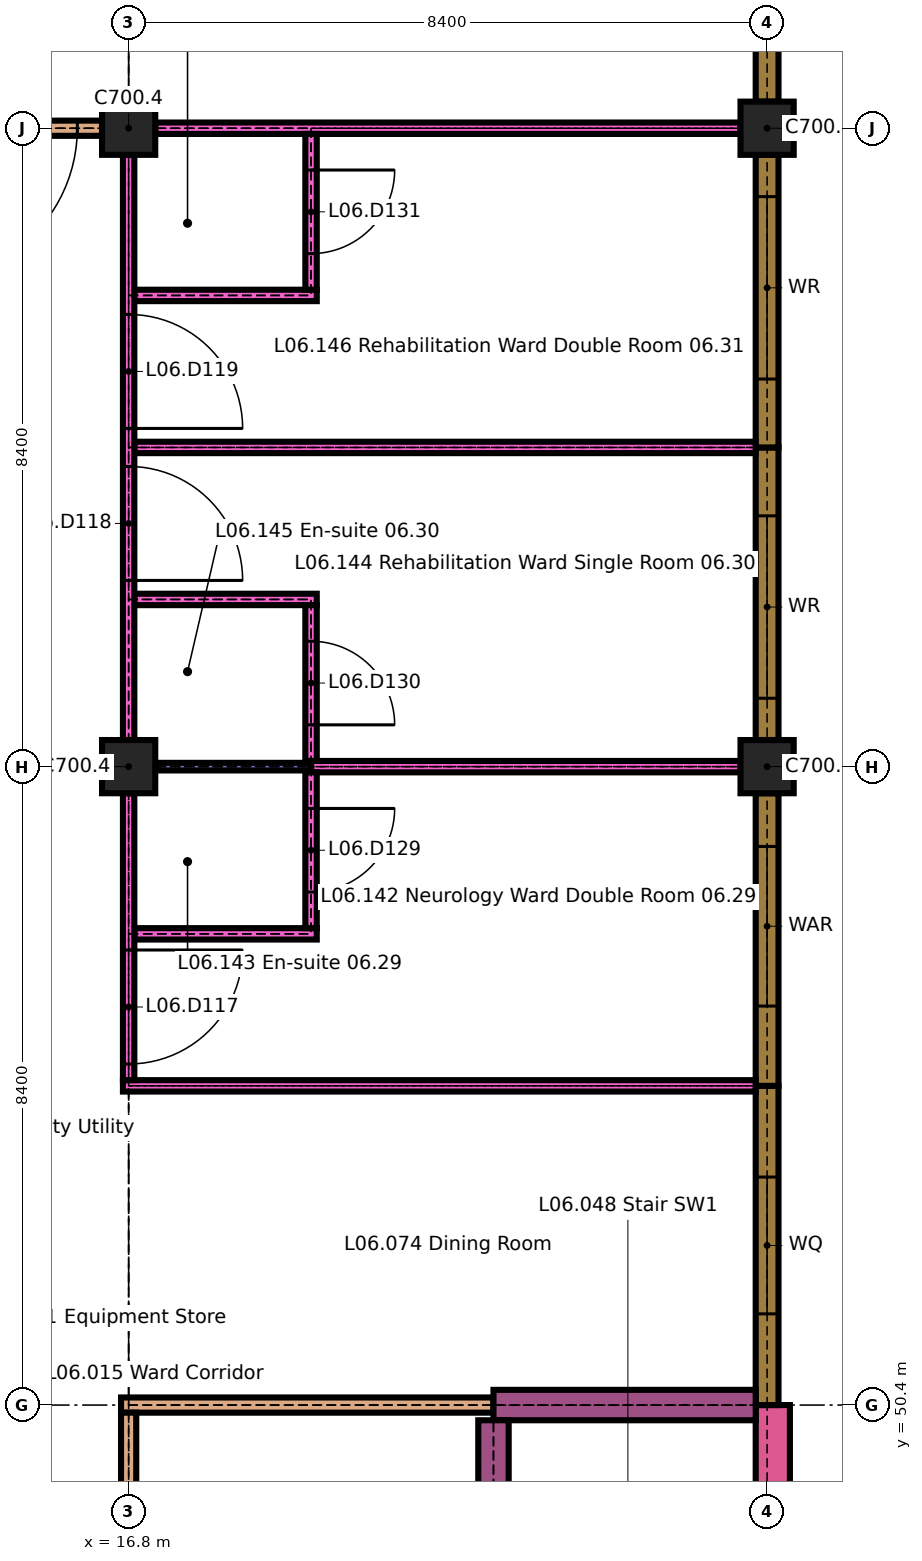
"""IFC4 building model, lengths in metres.
Left out: names, types, materials, properties, quantities, classifications, styles, units other than length and angle.
Written with IfcOpenShell. Run it as: python <this file> out.ifc"""

import sys

from ifc_helpers import new_model, si_unit, direction, frame, frame_2d, origin, origin_2d, place, context, subcontext, project, spatial, rectangle, extrude, element, fill, save


model = new_model("IFC4")
c1 = context("Model", 3, precision=1e-05, world=origin(), true_north=direction((0.0, 1.0)))
c2 = subcontext(c1, "Body", "Model", "MODEL_VIEW")
j1 = project(units=[si_unit("LENGTHUNIT", "METRE"), si_unit("PLANEANGLEUNIT", "RADIAN")], contexts=[c1])
p1 = place(None, origin())
s1 = spatial("IfcSite", under=j1, at=p1, CompositionType="ELEMENT")
p2 = place(p1, origin())
s2 = spatial("IfcBuilding", under=s1, at=p2, CompositionType="ELEMENT")
p3 = place(p2, frame((0.0, 0.0, 26.1)))
s3 = spatial("IfcBuildingStorey", under=s2, at=p3, CompositionType="ELEMENT", Elevation=26.1)
p4 = place(p3, frame((16.8, 58.8, 0.0), z_axis=(0.0, 0.0, 1.0), x_axis=(1.0, 0.0, 0.0)))
e1 = element("IfcColumn", 1, at=p4, inside=s3, PredefinedType="COLUMN", context=c2, shape_type="SweptSolid", body=[
    extrude(rectangle(XDim=0.7, YDim=0.7, at=origin_2d()), origin(), (0.0, 0.0, 1.0), 3.3),
])
p5 = place(p3, frame((25.2, 58.8, 0.0), z_axis=(0.0, 0.0, 1.0), x_axis=(1.0, 0.0, 0.0)))
e2 = element("IfcColumn", 2, at=p5, inside=s3, PredefinedType="COLUMN", context=c2, shape_type="SweptSolid", body=[
    extrude(rectangle(XDim=0.7, YDim=0.7, at=origin_2d()), origin(), (0.0, 0.0, 1.0), 3.2),
])
p6 = place(p3, frame((16.8, 67.2, 0.0), z_axis=(0.0, 0.0, 1.0), x_axis=(1.0, 0.0, 0.0)))
e3 = element("IfcColumn", 3, at=p6, inside=s3, PredefinedType="COLUMN", context=c2, shape_type="SweptSolid", body=[
    extrude(rectangle(XDim=0.7, YDim=0.7, at=origin_2d()), origin(), (0.0, 0.0, 1.0), 3.3),
])
p7 = place(p3, frame((25.2, 67.2, 0.0), z_axis=(0.0, 0.0, 1.0), x_axis=(1.0, 0.0, 0.0)))
e4 = element("IfcColumn", 4, at=p7, inside=s3, PredefinedType="COLUMN", context=c2, shape_type="SweptSolid", body=[
    extrude(rectangle(XDim=0.7, YDim=0.7, at=origin_2d()), origin(), (0.0, 0.0, 1.0), 3.2),
])
p8 = place(p3, frame((25.275, 46.55, 0.0), z_axis=(0.0, 0.0, 1.0), x_axis=(0.0, 1.0, 0.0)))
e5 = element("IfcWall", 5, at=p8, inside=s3, PredefinedType="SOLIDWALL", context=c2, shape_type="SweptSolid", body=[
    extrude(rectangle(XDim=3.85, YDim=0.45, at=frame_2d((1.925, 0.0))), origin(), (0.0, 0.0, 1.0), 3.3),
])
p9 = place(p3, frame((25.2, 50.4, 0.0), z_axis=(0.0, 0.0, 1.0), x_axis=(0.0, 1.0, 0.0)))
e6 = element("IfcWall", 6, at=p9, inside=s3, PredefinedType="SOLIDWALL", context=c2, shape_type="SweptSolid", body=[
    extrude(rectangle(XDim=4.2, YDim=0.3, at=frame_2d((2.1, 0.0))), origin(), (0.0, 0.0, 1.0), 2.9),
])
p10 = place(p9, frame((1.2, 0.0, 1.05)))
e7 = element("IfcOpeningElement", 7, at=p10, cuts=e6, PredefinedType="OPENING", context=c2, shape_type="SweptSolid", body=[
    extrude(rectangle(XDim=1.8, YDim=1.2, at=frame_2d((0.9, 0.6))), frame((0.0, 0.16, 0.0), z_axis=(0.0, -1.0, 0.0), x_axis=(1.0, 0.0, 0.0)), (0.0, 0.0, 1.0), 0.32),
])
p11 = place(p3, frame((25.2, 54.6, 0.0), z_axis=(0.0, 0.0, 1.0), x_axis=(0.0, 1.0, 0.0)))
e8 = element("IfcWall", 8, at=p11, inside=s3, PredefinedType="SOLIDWALL", context=c2, shape_type="SweptSolid", body=[
    extrude(rectangle(XDim=3.85, YDim=0.3, at=frame_2d((1.925, 0.0))), origin(), (0.0, 0.0, 1.0), 2.9),
])
p12 = place(p11, frame((1.05, 0.0, 0.9)))
e9 = element("IfcOpeningElement", 9, at=p12, cuts=e8, PredefinedType="OPENING", context=c2, shape_type="SweptSolid", body=[
    extrude(rectangle(XDim=2.1, YDim=1.5, at=frame_2d((1.05, 0.75))), frame((0.0, 0.16, 0.0), z_axis=(0.0, -1.0, 0.0), x_axis=(1.0, 0.0, 0.0)), (0.0, 0.0, 1.0), 0.32),
])
p13 = place(p3, frame((25.2, 59.15, 0.0), z_axis=(0.0, 0.0, 1.0), x_axis=(0.0, 1.0, 0.0)))
e10 = element("IfcWall", 10, at=p13, inside=s3, PredefinedType="SOLIDWALL", context=c2, shape_type="SweptSolid", body=[
    extrude(rectangle(XDim=3.85, YDim=0.3, at=frame_2d((1.925, 0.0))), origin(), (0.0, 0.0, 1.0), 2.9),
])
p14 = place(p13, frame((0.55, 0.0, 0.6)))
e11 = element("IfcOpeningElement", 11, at=p14, cuts=e10, PredefinedType="OPENING", context=c2, shape_type="SweptSolid", body=[
    extrude(rectangle(XDim=2.4, YDim=1.8, at=frame_2d((1.2, 0.9))), frame((0.0, 0.16, 0.0), z_axis=(0.0, -1.0, 0.0), x_axis=(1.0, 0.0, 0.0)), (0.0, 0.0, 1.0), 0.32),
])
p15 = place(p3, frame((25.2, 63.0, 0.0), z_axis=(0.0, 0.0, 1.0), x_axis=(0.0, 1.0, 0.0)))
e12 = element("IfcWall", 12, at=p15, inside=s3, PredefinedType="SOLIDWALL", context=c2, shape_type="SweptSolid", body=[
    extrude(rectangle(XDim=3.85, YDim=0.3, at=frame_2d((1.925, 0.0))), origin(), (0.0, 0.0, 1.0), 2.9),
])
p16 = place(p15, frame((0.9, 0.0, 0.6)))
e13 = element("IfcOpeningElement", 13, at=p16, cuts=e12, PredefinedType="OPENING", context=c2, shape_type="SweptSolid", body=[
    extrude(rectangle(XDim=2.4, YDim=1.8, at=frame_2d((1.2, 0.9))), frame((0.0, 0.16, 0.0), z_axis=(0.0, -1.0, 0.0), x_axis=(1.0, 0.0, 0.0)), (0.0, 0.0, 1.0), 0.32),
])
p17 = place(p3, frame((25.2, 67.55, 0.0), z_axis=(0.0, 0.0, 1.0), x_axis=(0.0, 1.0, 0.0)))
e14 = element("IfcWall", 14, at=p17, inside=s3, PredefinedType="SOLIDWALL", context=c2, shape_type="SweptSolid", body=[
    extrude(rectangle(XDim=1.1, YDim=0.3, at=frame_2d((0.55, 0.0))), origin(), (0.0, 0.0, 1.0), 2.9),
])
p18 = place(p3, frame((16.7, 50.4, 0.0), z_axis=(0.0, 0.0, 1.0), x_axis=(1.0, 0.0, 0.0)))
e15 = element("IfcWall", 15, at=p18, inside=s3, PredefinedType="PARTITIONING", context=c2, shape_type="SweptSolid", body=[
    extrude(rectangle(XDim=4.9, YDim=0.2, at=frame_2d((2.45, 0.0))), origin(), (0.0, 0.0, 1.0), 3.3),
])
p19 = place(p3, frame((21.6, 50.4, 0.0), z_axis=(0.0, 0.0, 1.0), x_axis=(1.0, 0.0, 0.0)))
e16 = element("IfcWall", 16, at=p19, inside=s3, PredefinedType="SHEAR", context=c2, shape_type="SweptSolid", body=[
    extrude(rectangle(XDim=3.45, YDim=0.4, at=frame_2d((1.725, 0.0))), origin(), (0.0, 0.0, 1.0), 3.3),
])
p20 = place(p3, frame((16.725, 54.6, 0.0), z_axis=(0.0, 0.0, 1.0), x_axis=(1.0, 0.0, 0.0)))
e17 = element("IfcWall", 17, at=p20, inside=s3, PredefinedType="PARTITIONING", context=c2, shape_type="SweptSolid", body=[
    extrude(rectangle(XDim=8.325, YDim=0.15, at=frame_2d((4.163, 0.0))), origin(), (0.0, 0.0, 1.0), 3.3),
])
p21 = place(p3, frame((16.875, 56.6, 0.0), z_axis=(0.0, 0.0, 1.0), x_axis=(1.0, 0.0, 0.0)))
e18 = element("IfcWall", 18, at=p21, inside=s3, PredefinedType="PARTITIONING", context=c2, shape_type="SweptSolid", body=[
    extrude(rectangle(XDim=2.4, YDim=0.15, at=frame_2d((1.2, 0.0))), origin(), (0.0, 0.0, 1.0), 3.3),
])
p22 = place(p3, frame((17.15, 58.8, 0.0), z_axis=(0.0, 0.0, 1.0), x_axis=(1.0, 0.0, 0.0)))
e19 = element("IfcWall", 19, at=p22, inside=s3, PredefinedType="PARTITIONING", context=c2, shape_type="SweptSolid", body=[
    extrude(rectangle(XDim=2.05, YDim=0.1, at=frame_2d((1.025, 0.0))), origin(), (0.0, 0.0, 1.0), 3.3),
])
p23 = place(p3, frame((19.2, 58.8, 0.0), z_axis=(0.0, 0.0, 1.0), x_axis=(1.0, 0.0, 0.0)))
e20 = element("IfcWall", 20, at=p23, inside=s3, PredefinedType="PARTITIONING", context=c2, shape_type="SweptSolid", body=[
    extrude(rectangle(XDim=5.65, YDim=0.15, at=frame_2d((2.825, 0.0))), origin(), (0.0, 0.0, 1.0), 3.3),
])
p24 = place(p3, frame((16.875, 61.0, 0.0), z_axis=(0.0, 0.0, 1.0), x_axis=(1.0, 0.0, 0.0)))
e21 = element("IfcWall", 21, at=p24, inside=s3, PredefinedType="PARTITIONING", context=c2, shape_type="SweptSolid", body=[
    extrude(rectangle(XDim=2.4, YDim=0.15, at=frame_2d((1.2, 0.0))), origin(), (0.0, 0.0, 1.0), 3.3),
])
p25 = place(p3, frame((16.875, 63.0, 0.0), z_axis=(0.0, 0.0, 1.0), x_axis=(1.0, 0.0, 0.0)))
e22 = element("IfcWall", 22, at=p25, inside=s3, PredefinedType="PARTITIONING", context=c2, shape_type="SweptSolid", body=[
    extrude(rectangle(XDim=8.175, YDim=0.15, at=frame_2d((4.087, 0.0))), origin(), (0.0, 0.0, 1.0), 3.3),
])
p26 = place(p3, frame((16.875, 65.0, 0.0), z_axis=(0.0, 0.0, 1.0), x_axis=(1.0, 0.0, 0.0)))
e23 = element("IfcWall", 23, at=p26, inside=s3, PredefinedType="PARTITIONING", context=c2, shape_type="SweptSolid", body=[
    extrude(rectangle(XDim=2.4, YDim=0.15, at=frame_2d((1.2, 0.0))), origin(), (0.0, 0.0, 1.0), 3.3),
])
p27 = place(p3, frame((3.6, 67.2, 0.0), z_axis=(0.0, 0.0, 1.0), x_axis=(1.0, 0.0, 0.0)))
e24 = element("IfcWall", 24, at=p27, inside=s3, PredefinedType="PARTITIONING", context=c2, shape_type="SweptSolid", body=[
    extrude(rectangle(XDim=12.85, YDim=0.2, at=frame_2d((6.425, 0.0))), origin(), (0.0, 0.0, 1.0), 3.3),
])
p28 = place(p27, frame((5.3, 0.0, 0.0)))
e25 = element("IfcOpeningElement", 25, at=p28, cuts=e24, PredefinedType="OPENING", context=c2, shape_type="SweptSolid", body=[
    extrude(rectangle(XDim=2.0, YDim=2.4, at=frame_2d((1.0, 1.2))), frame((0.0, 0.11, 0.0), z_axis=(0.0, -1.0, 0.0), x_axis=(1.0, 0.0, 0.0)), (0.0, 0.0, 1.0), 0.22),
])
p29 = place(p27, frame((10.525, 0.0, 0.0)))
e26 = element("IfcOpeningElement", 26, at=p29, cuts=e24, PredefinedType="OPENING", context=c2, shape_type="SweptSolid", body=[
    extrude(rectangle(XDim=2.0, YDim=2.4, at=frame_2d((1.0, 1.2))), frame((0.0, 0.11, 0.0), z_axis=(0.0, -1.0, 0.0), x_axis=(1.0, 0.0, 0.0)), (0.0, 0.0, 1.0), 0.22),
])
p30 = place(p3, frame((17.15, 67.2, 0.0), z_axis=(0.0, 0.0, 1.0), x_axis=(1.0, 0.0, 0.0)))
e27 = element("IfcWall", 27, at=p30, inside=s3, PredefinedType="PARTITIONING", context=c2, shape_type="SweptSolid", body=[
    extrude(rectangle(XDim=7.7, YDim=0.15, at=frame_2d((3.85, 0.0))), origin(), (0.0, 0.0, 1.0), 3.3),
])
p31 = place(p3, frame((16.8, 42.0, 0.0), z_axis=(0.0, 0.0, 1.0), x_axis=(0.0, 1.0, 0.0)))
e28 = element("IfcWall", 28, at=p31, inside=s3, PredefinedType="PARTITIONING", context=c2, shape_type="SweptSolid", body=[
    extrude(rectangle(XDim=8.3, YDim=0.2, at=frame_2d((4.15, 0.0))), origin(), (0.0, 0.0, 1.0), 3.3),
])
p32 = place(p31, frame((3.15, 0.0, 0.0)))
e29 = element("IfcOpeningElement", 29, at=p32, cuts=e28, PredefinedType="OPENING", context=c2, shape_type="SweptSolid", body=[
    extrude(rectangle(XDim=2.0, YDim=2.4, at=frame_2d((1.0, 1.2))), frame((0.0, 0.11, 0.0), z_axis=(0.0, -1.0, 0.0), x_axis=(1.0, 0.0, 0.0)), (0.0, 0.0, 1.0), 0.22),
])
p33 = place(p3, frame((16.8, 54.675, 0.0), z_axis=(0.0, 0.0, 1.0), x_axis=(0.0, 1.0, 0.0)))
e30 = element("IfcWall", 30, at=p33, inside=s3, PredefinedType="PARTITIONING", context=c2, shape_type="SweptSolid", body=[
    extrude(rectangle(XDim=3.775, YDim=0.15, at=frame_2d((1.887, 0.0))), origin(), (0.0, 0.0, 1.0), 3.3),
])
p34 = place(p33, frame((0.212, 0.0, 0.0)))
e31 = element("IfcOpeningElement", 31, at=p34, cuts=e30, PredefinedType="OPENING", context=c2, shape_type="SweptSolid", body=[
    extrude(rectangle(XDim=1.5, YDim=2.4, at=frame_2d((0.75, 1.2))), frame((0.0, 0.085, 0.0), z_axis=(0.0, -1.0, 0.0), x_axis=(1.0, 0.0, 0.0)), (0.0, 0.0, 1.0), 0.17),
])
p35 = place(p3, frame((16.8, 59.15, 0.0), z_axis=(0.0, 0.0, 1.0), x_axis=(0.0, 1.0, 0.0)))
e32 = element("IfcWall", 32, at=p35, inside=s3, PredefinedType="PARTITIONING", context=c2, shape_type="SweptSolid", body=[
    extrude(rectangle(XDim=7.7, YDim=0.15, at=frame_2d((3.85, 0.0))), origin(), (0.0, 0.0, 1.0), 3.3),
])
p36 = place(p35, frame((2.1, 0.0, 0.0)))
e33 = element("IfcOpeningElement", 33, at=p36, cuts=e32, PredefinedType="OPENING", context=c2, shape_type="SweptSolid", body=[
    extrude(rectangle(XDim=1.5, YDim=2.4, at=frame_2d((0.75, 1.2))), frame((0.0, 0.085, 0.0), z_axis=(0.0, -1.0, 0.0), x_axis=(1.0, 0.0, 0.0)), (0.0, 0.0, 1.0), 0.17),
])
p37 = place(p35, frame((4.1, 0.0, 0.0)))
e34 = element("IfcOpeningElement", 34, at=p37, cuts=e32, PredefinedType="OPENING", context=c2, shape_type="SweptSolid", body=[
    extrude(rectangle(XDim=1.5, YDim=2.4, at=frame_2d((0.75, 1.2))), frame((0.0, 0.085, 0.0), z_axis=(0.0, -1.0, 0.0), x_axis=(1.0, 0.0, 0.0)), (0.0, 0.0, 1.0), 0.17),
])
p38 = place(p3, frame((19.2, 56.675, 0.0), z_axis=(0.0, 0.0, 1.0), x_axis=(0.0, 1.0, 0.0)))
e35 = element("IfcWall", 35, at=p38, inside=s3, PredefinedType="PARTITIONING", context=c2, shape_type="SweptSolid", body=[
    extrude(rectangle(XDim=2.05, YDim=0.15, at=frame_2d((1.025, 0.0))), origin(), (0.0, 0.0, 1.0), 3.3),
])
p39 = place(p38, frame((0.475, 0.0, 0.0)))
e36 = element("IfcOpeningElement", 36, at=p39, cuts=e35, PredefinedType="OPENING", context=c2, shape_type="SweptSolid", body=[
    extrude(rectangle(XDim=1.1, YDim=2.1, at=frame_2d((0.55, 1.05))), frame((0.0, 0.085, 0.0), z_axis=(0.0, -1.0, 0.0), x_axis=(1.0, 0.0, 0.0)), (0.0, 0.0, 1.0), 0.17),
])
p40 = place(p3, frame((19.2, 58.875, 0.0), z_axis=(0.0, 0.0, 1.0), x_axis=(0.0, 1.0, 0.0)))
e37 = element("IfcWall", 37, at=p40, inside=s3, PredefinedType="PARTITIONING", context=c2, shape_type="SweptSolid", body=[
    extrude(rectangle(XDim=2.05, YDim=0.15, at=frame_2d((1.025, 0.0))), origin(), (0.0, 0.0, 1.0), 3.3),
])
p41 = place(p40, frame((0.475, 0.0, 0.0)))
e38 = element("IfcOpeningElement", 38, at=p41, cuts=e37, PredefinedType="OPENING", context=c2, shape_type="SweptSolid", body=[
    extrude(rectangle(XDim=1.1, YDim=2.1, at=frame_2d((0.55, 1.05))), frame((0.0, 0.085, 0.0), z_axis=(0.0, -1.0, 0.0), x_axis=(1.0, 0.0, 0.0)), (0.0, 0.0, 1.0), 0.17),
])
p42 = place(p3, frame((19.2, 65.075, 0.0), z_axis=(0.0, 0.0, 1.0), x_axis=(0.0, 1.0, 0.0)))
e39 = element("IfcWall", 39, at=p42, inside=s3, PredefinedType="PARTITIONING", context=c2, shape_type="SweptSolid", body=[
    extrude(rectangle(XDim=2.05, YDim=0.15, at=frame_2d((1.025, 0.0))), origin(), (0.0, 0.0, 1.0), 3.3),
])
p43 = place(p42, frame((0.475, 0.0, 0.0)))
e40 = element("IfcOpeningElement", 40, at=p43, cuts=e39, PredefinedType="OPENING", context=c2, shape_type="SweptSolid", body=[
    extrude(rectangle(XDim=1.1, YDim=2.1, at=frame_2d((0.55, 1.05))), frame((0.0, 0.085, 0.0), z_axis=(0.0, -1.0, 0.0), x_axis=(1.0, 0.0, 0.0)), (0.0, 0.0, 1.0), 0.17),
])
p44 = place(p3, frame((21.6, 42.2, 0.0), z_axis=(0.0, 0.0, 1.0), x_axis=(0.0, 1.0, 0.0)))
e41 = element("IfcWall", 41, at=p44, inside=s3, PredefinedType="SHEAR", context=c2, shape_type="SweptSolid", body=[
    extrude(rectangle(XDim=8.0, YDim=0.4, at=frame_2d((4.0, 0.0))), origin(), (0.0, 0.0, 1.0), 3.3),
])
p45 = place(p44, frame((0.4, 0.0, 0.0)))
e42 = element("IfcOpeningElement", 42, at=p45, cuts=e41, PredefinedType="OPENING", context=c2, shape_type="SweptSolid", body=[
    extrude(rectangle(XDim=1.2, YDim=2.1, at=frame_2d((0.6, 1.05))), frame((0.0, 0.21, 0.0), z_axis=(0.0, -1.0, 0.0), x_axis=(1.0, 0.0, 0.0)), (0.0, 0.0, 1.0), 0.42),
])
p46 = place(p10, origin())
e43 = element("IfcWindow", 43, at=p46, inside=s3, PartitioningType="DOUBLE_PANEL_VERTICAL", PredefinedType="WINDOW", context=c2, shape_type="SweptSolid", body=[
    extrude(rectangle(XDim=1.8, YDim=1.2, at=frame_2d((0.9, 0.6))), frame((0.0, 0.03, 0.0), z_axis=(0.0, -1.0, 0.0), x_axis=(1.0, 0.0, 0.0)), (0.0, 0.0, 1.0), 0.06),
])
fill(e7, e43)
p47 = place(p12, origin())
e44 = element("IfcWindow", 44, at=p47, inside=s3, PartitioningType="DOUBLE_PANEL_VERTICAL", PredefinedType="WINDOW", context=c2, shape_type="SweptSolid", body=[
    extrude(rectangle(XDim=2.1, YDim=1.5, at=frame_2d((1.05, 0.75))), frame((0.0, 0.05, 0.0), z_axis=(0.0, -1.0, 0.0), x_axis=(1.0, 0.0, 0.0)), (0.0, 0.0, 1.0), 0.1),
])
fill(e9, e44)
p48 = place(p14, origin())
e45 = element("IfcWindow", 45, at=p48, inside=s3, PartitioningType="DOUBLE_PANEL_VERTICAL", PredefinedType="WINDOW", context=c2, shape_type="SweptSolid", body=[
    extrude(rectangle(XDim=2.4, YDim=1.8, at=frame_2d((1.2, 0.9))), frame((0.0, 0.03, 0.0), z_axis=(0.0, -1.0, 0.0), x_axis=(1.0, 0.0, 0.0)), (0.0, 0.0, 1.0), 0.06),
])
fill(e11, e45)
p49 = place(p16, origin())
e46 = element("IfcWindow", 46, at=p49, inside=s3, PartitioningType="DOUBLE_PANEL_VERTICAL", PredefinedType="WINDOW", context=c2, shape_type="SweptSolid", body=[
    extrude(rectangle(XDim=2.4, YDim=1.8, at=frame_2d((1.2, 0.9))), frame((0.0, 0.03, 0.0), z_axis=(0.0, -1.0, 0.0), x_axis=(1.0, 0.0, 0.0)), (0.0, 0.0, 1.0), 0.06),
])
fill(e13, e46)
p50 = place(p29, origin())
e47 = element("IfcDoor", 47, at=p50, inside=s3, OperationType="SINGLE_SWING_LEFT", PredefinedType="DOOR", context=c2, shape_type="SweptSolid", body=[
    extrude(rectangle(XDim=2.0, YDim=2.4, at=frame_2d((1.0, 1.2))), frame((0.0, 0.03, 0.0), z_axis=(0.0, -1.0, 0.0), x_axis=(1.0, 0.0, 0.0)), (0.0, 0.0, 1.0), 0.06),
])
fill(e26, e47)
p51 = place(p34, origin())
e48 = element("IfcDoor", 48, at=p51, inside=s3, OperationType="SINGLE_SWING_RIGHT", PredefinedType="DOOR", context=c2, shape_type="SweptSolid", body=[
    extrude(rectangle(XDim=1.5, YDim=2.4, at=frame_2d((0.75, 1.2))), frame((0.0, 0.03, 0.0), z_axis=(0.0, -1.0, 0.0), x_axis=(1.0, 0.0, 0.0)), (0.0, 0.0, 1.0), 0.06),
])
fill(e31, e48)
p52 = place(p36, origin())
e49 = element("IfcDoor", 49, at=p52, inside=s3, OperationType="SINGLE_SWING_LEFT", PredefinedType="DOOR", context=c2, shape_type="SweptSolid", body=[
    extrude(rectangle(XDim=1.5, YDim=2.4, at=frame_2d((0.75, 1.2))), frame((0.0, 0.03, 0.0), z_axis=(0.0, -1.0, 0.0), x_axis=(1.0, 0.0, 0.0)), (0.0, 0.0, 1.0), 0.06),
])
fill(e33, e49)
p53 = place(p37, origin())
e50 = element("IfcDoor", 50, at=p53, inside=s3, OperationType="SINGLE_SWING_LEFT", PredefinedType="DOOR", context=c2, shape_type="SweptSolid", body=[
    extrude(rectangle(XDim=1.5, YDim=2.4, at=frame_2d((0.75, 1.2))), frame((0.0, 0.03, 0.0), z_axis=(0.0, -1.0, 0.0), x_axis=(1.0, 0.0, 0.0)), (0.0, 0.0, 1.0), 0.06),
])
fill(e34, e50)
p54 = place(p39, origin())
e51 = element("IfcDoor", 51, at=p54, inside=s3, OperationType="SINGLE_SWING_RIGHT", PredefinedType="DOOR", context=c2, shape_type="SweptSolid", body=[
    extrude(rectangle(XDim=1.1, YDim=2.1, at=frame_2d((0.55, 1.05))), frame((0.0, 0.025, 0.0), z_axis=(0.0, -1.0, 0.0), x_axis=(1.0, 0.0, 0.0)), (0.0, 0.0, 1.0), 0.05),
])
fill(e36, e51)
p55 = place(p41, origin())
e52 = element("IfcDoor", 52, at=p55, inside=s3, OperationType="SINGLE_SWING_LEFT", PredefinedType="DOOR", context=c2, shape_type="SweptSolid", body=[
    extrude(rectangle(XDim=1.1, YDim=2.1, at=frame_2d((0.55, 1.05))), frame((0.0, 0.025, 0.0), z_axis=(0.0, -1.0, 0.0), x_axis=(1.0, 0.0, 0.0)), (0.0, 0.0, 1.0), 0.05),
])
fill(e38, e52)
p56 = place(p43, origin())
e53 = element("IfcDoor", 53, at=p56, inside=s3, OperationType="SINGLE_SWING_RIGHT", PredefinedType="DOOR", context=c2, shape_type="SweptSolid", body=[
    extrude(rectangle(XDim=1.1, YDim=2.1, at=frame_2d((0.55, 1.05))), frame((0.0, 0.025, 0.0), z_axis=(0.0, -1.0, 0.0), x_axis=(1.0, 0.0, 0.0)), (0.0, 0.0, 1.0), 0.05),
])
fill(e40, e53)
save(model, sys.argv[1])
